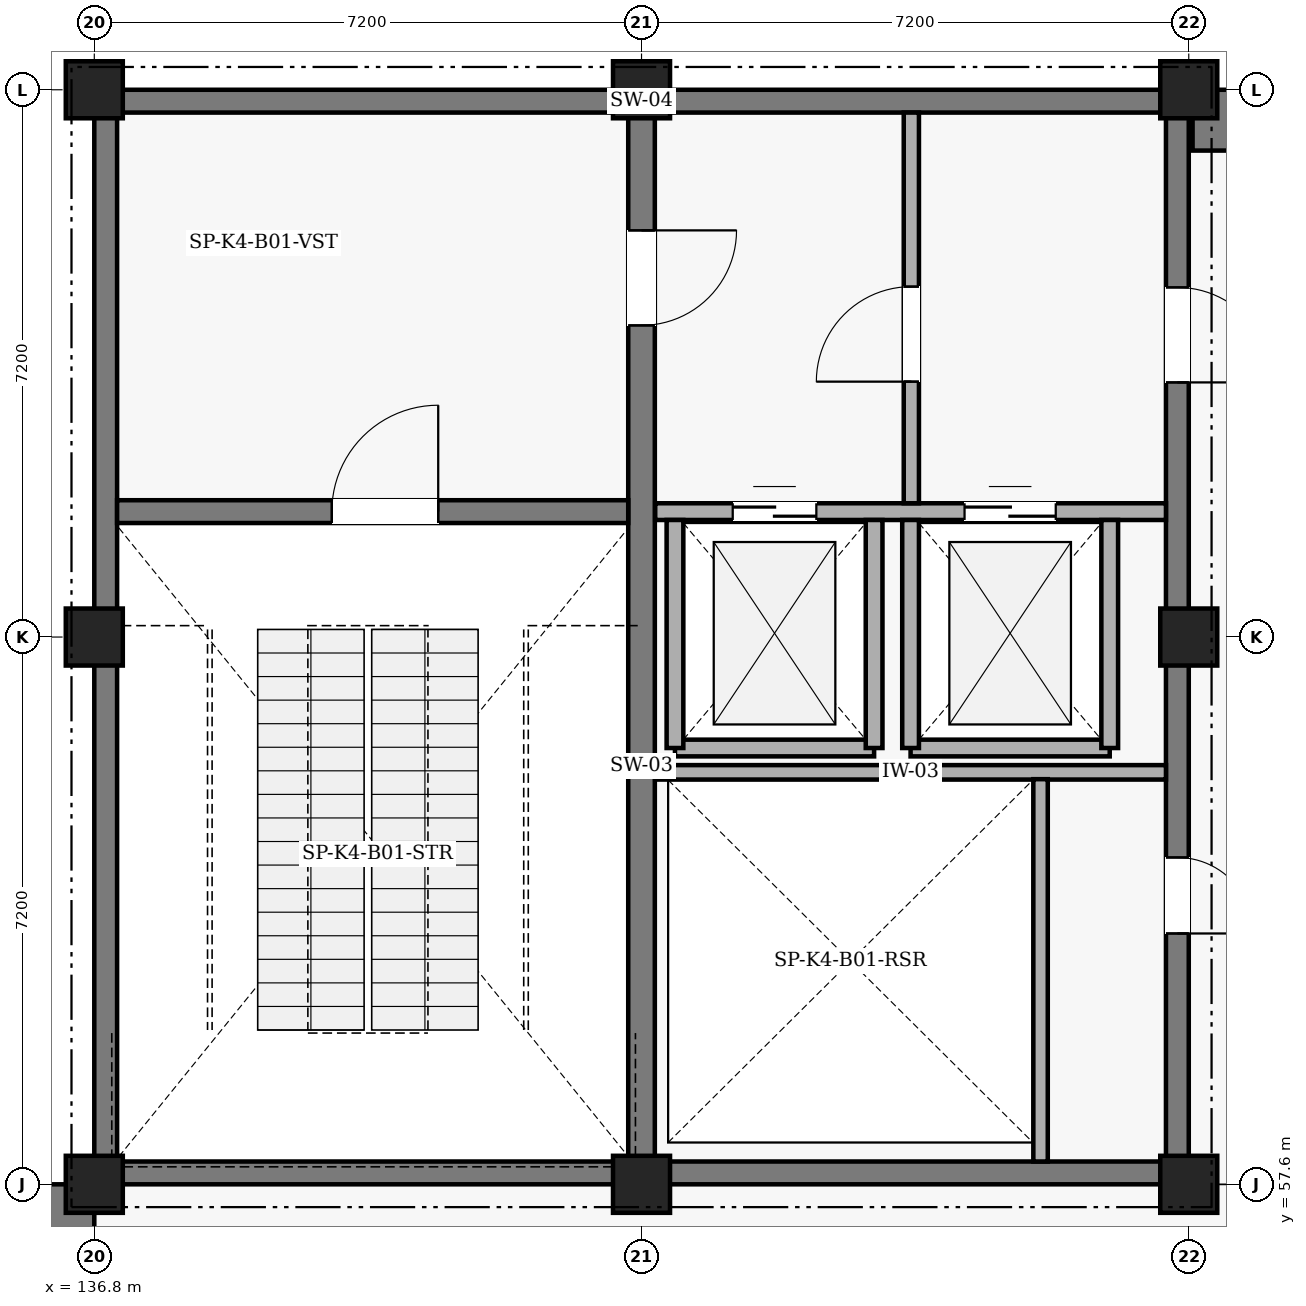
"""IFC4 building model, lengths in metres.
Left out: names, types, materials, properties, quantities, classifications, styles, units other than length and angle.
Written with IfcOpenShell. Run it as: python <this file> out.ifc"""

import sys

from ifc_helpers import new_model, si_unit, direction, frame, frame_2d, origin, origin_2d, place, context, subcontext, project, spatial, rectangle, extrude, element, fill, save


model = new_model("IFC4")
c1 = context("Model", 3, precision=1e-05, world=origin(), true_north=direction((0.0, 1.0)))
c2 = subcontext(c1, "Body", "Model", "MODEL_VIEW")
j1 = project(units=[si_unit("LENGTHUNIT", "METRE"), si_unit("PLANEANGLEUNIT", "RADIAN")], contexts=[c1])
p1 = place(None, origin())
s1 = spatial("IfcSite", under=j1, at=p1, CompositionType="ELEMENT")
p2 = place(p1, origin())
s2 = spatial("IfcBuilding", under=s1, at=p2, CompositionType="ELEMENT")
p3 = place(p2, frame((0.0, 0.0, -5.4)))
s3 = spatial("IfcBuildingStorey", under=s2, at=p3, CompositionType="ELEMENT", Elevation=-5.4)
p4 = place(p3, frame((123.3, 57.2, 0.0), z_axis=(0.0, 0.0, 1.0), x_axis=(1.0, 0.0, 0.0)))
e1 = element("IfcWall", 1, at=p4, inside=s3, PredefinedType="USERDEFINED", context=c2, shape_type="SweptSolid", body=[
    extrude(rectangle(XDim=13.5, YDim=0.8, at=frame_2d((6.75, 0.0))), origin(), (0.0, 0.0, 1.0), 4.95),
])
p5 = place(p3, frame((151.25, 71.6, 0.0), z_axis=(0.0, 0.0, 1.0), x_axis=(1.0, 0.0, 0.0)))
e2 = element("IfcWall", 2, at=p5, inside=s3, PredefinedType="USERDEFINED", context=c2, shape_type="SweptSolid", body=[
    extrude(rectangle(XDim=7.15, YDim=0.8, at=frame_2d((3.575, 0.0))), origin(), (0.0, 0.0, 1.0), 4.95),
])
p6 = place(p3, frame((136.8, 71.85, 0.0), z_axis=(0.0, 0.0, 1.0), x_axis=(1.0, 0.0, 0.0)))
e3 = element("IfcWall", 3, at=p6, inside=s3, PredefinedType="SHEAR", context=c2, shape_type="SweptSolid", body=[
    extrude(rectangle(XDim=14.4, YDim=0.3, at=frame_2d((7.2, 0.0))), origin(), (0.0, 0.0, 1.0), 5.4),
])
p7 = place(p3, frame((151.05, 71.7, 0.0), z_axis=(0.0, 0.0, 1.0), x_axis=(0.0, -1.0, 0.0)))
e4 = element("IfcWall", 4, at=p7, inside=s3, PredefinedType="SHEAR", context=c2, shape_type="SweptSolid", body=[
    extrude(rectangle(XDim=13.8, YDim=0.3, at=frame_2d((6.9, 0.0))), origin(), (0.0, 0.0, 1.0), 5.4),
])
p8 = place(p7, frame((9.8, 0.0, 0.0)))
e5 = element("IfcOpeningElement", 5, at=p8, cuts=e4, PredefinedType="OPENING", context=c2, shape_type="SweptSolid", body=[
    extrude(rectangle(XDim=1.0, YDim=2.15, at=frame_2d((0.5, 1.075))), frame((0.0, 0.16, 0.0), z_axis=(0.0, -1.0, 0.0), x_axis=(1.0, 0.0, 0.0)), (0.0, 0.0, 1.0), 0.32),
])
p9 = place(p7, frame((2.3, 0.0, 0.0)))
e6 = element("IfcOpeningElement", 6, at=p9, cuts=e4, PredefinedType="OPENING", context=c2, shape_type="SweptSolid", body=[
    extrude(rectangle(XDim=1.25, YDim=2.2, at=frame_2d((0.625, 1.1))), frame((0.0, 0.16, 0.0), z_axis=(0.0, -1.0, 0.0), x_axis=(1.0, 0.0, 0.0)), (0.0, 0.0, 1.0), 0.32),
])
p10 = place(p3, frame((151.2, 57.75, 0.0), z_axis=(0.0, 0.0, 1.0), x_axis=(-1.0, 0.0, 0.0)))
e7 = element("IfcWall", 7, at=p10, inside=s3, PredefinedType="SHEAR", context=c2, shape_type="SweptSolid", body=[
    extrude(rectangle(XDim=14.4, YDim=0.3, at=frame_2d((7.2, 0.0))), origin(), (0.0, 0.0, 1.0), 5.4),
])
p11 = place(p3, frame((136.95, 57.9, 0.0), z_axis=(0.0, 0.0, 1.0), x_axis=(0.0, 1.0, 0.0)))
e8 = element("IfcWall", 8, at=p11, inside=s3, PredefinedType="SHEAR", context=c2, shape_type="SweptSolid", body=[
    extrude(rectangle(XDim=13.8, YDim=0.3, at=frame_2d((6.9, 0.0))), origin(), (0.0, 0.0, 1.0), 5.4),
])
p12 = place(p3, frame((144.0, 71.7, 0.0), z_axis=(0.0, 0.0, 1.0), x_axis=(0.0, -1.0, 0.0)))
e9 = element("IfcWall", 9, at=p12, inside=s3, PredefinedType="SHEAR", context=c2, shape_type="SweptSolid", body=[
    extrude(rectangle(XDim=13.8, YDim=0.35, at=frame_2d((6.9, 0.0))), origin(), (0.0, 0.0, 1.0), 5.4),
])
p13 = place(p12, frame((1.55, 0.0, 0.0)))
e10 = element("IfcOpeningElement", 10, at=p13, cuts=e9, PredefinedType="OPENING", context=c2, shape_type="SweptSolid", body=[
    extrude(rectangle(XDim=1.25, YDim=2.2, at=frame_2d((0.625, 1.1))), frame((0.0, 0.185, 0.0), z_axis=(0.0, -1.0, 0.0), x_axis=(1.0, 0.0, 0.0)), (0.0, 0.0, 1.0), 0.37),
])
p14 = place(p3, frame((137.1, 66.45, 0.0), z_axis=(0.0, 0.0, 1.0), x_axis=(1.0, 0.0, 0.0)))
e11 = element("IfcWall", 11, at=p14, inside=s3, PredefinedType="SHEAR", context=c2, shape_type="SweptSolid", body=[
    extrude(rectangle(XDim=6.725, YDim=0.3, at=frame_2d((3.362, 0.0))), origin(), (0.0, 0.0, 1.0), 5.4),
])
p15 = place(p14, frame((2.825, 0.0, 0.0)))
e12 = element("IfcOpeningElement", 12, at=p15, cuts=e11, PredefinedType="OPENING", context=c2, shape_type="SweptSolid", body=[
    extrude(rectangle(XDim=1.4, YDim=2.2, at=frame_2d((0.7, 1.1))), frame((0.0, 0.16, 0.0), z_axis=(0.0, -1.0, 0.0), x_axis=(1.0, 0.0, 0.0)), (0.0, 0.0, 1.0), 0.32),
])
for number, where, z_axis, x_axis in (
    (13, (136.8, 57.6, 0.0), (0.0, 0.0, 1.0), (1.0, 0.0, 0.0)),
    (14, (136.8, 64.8, 0.0), (0.0, 0.0, 1.0), (1.0, 0.0, 0.0)),
    (15, (136.8, 72.0, 0.0), (0.0, 0.0, 1.0), (1.0, 0.0, 0.0)),
    (16, (144.0, 57.6, 0.0), (0.0, 0.0, 1.0), (1.0, 0.0, 0.0)),
    (17, (144.0, 72.0, 0.0), (0.0, 0.0, 1.0), (1.0, 0.0, 0.0)),
    (18, (151.2, 57.6, 0.0), (0.0, 0.0, 1.0), (1.0, 0.0, 0.0)),
    (19, (151.2, 64.8, 0.0), (0.0, 0.0, 1.0), (1.0, 0.0, 0.0)),
    (20, (151.2, 72.0, 0.0), (0.0, 0.0, 1.0), (1.0, 0.0, 0.0)),
):
    element("IfcColumn", number, at=place(p3, frame(where, z_axis=z_axis, x_axis=x_axis)), inside=s3, PredefinedType="COLUMN", context=c2, shape_type="SweptSolid", body=[
        extrude(rectangle(XDim=0.75, YDim=0.75, at=origin_2d()), origin(), (0.0, 0.0, 1.0), 5.0),
    ])
p16 = place(p3, frame((144.18, 63.02, 0.0), z_axis=(0.0, 0.0, 1.0), x_axis=(1.0, 0.0, 0.0)))
e21 = element("IfcWall", 21, at=p16, inside=s3, PredefinedType="PARTITIONING", context=c2, shape_type="SweptSolid", body=[
    extrude(rectangle(XDim=6.72, YDim=0.19, at=frame_2d((3.36, 0.0))), origin(), (0.0, 0.0, 1.0), 5.05),
])
p17 = place(p3, frame((149.25, 57.9, 0.0), z_axis=(0.0, 0.0, 1.0), x_axis=(0.0, 1.0, 0.0)))
e22 = element("IfcWall", 22, at=p17, inside=s3, PredefinedType="PARTITIONING", context=c2, shape_type="SweptSolid", body=[
    extrude(rectangle(XDim=5.03, YDim=0.19, at=frame_2d((2.515, 0.0))), origin(), (0.0, 0.0, 1.0), 5.05),
])
p18 = place(p3, frame((144.18, 66.45, 0.0), z_axis=(0.0, 0.0, 1.0), x_axis=(1.0, 0.0, 0.0)))
e23 = element("IfcWall", 23, at=p18, inside=s3, PredefinedType="PARTITIONING", context=c2, shape_type="SweptSolid", body=[
    extrude(rectangle(XDim=6.72, YDim=0.22, at=frame_2d((3.36, 0.0))), origin(), (0.0, 0.0, 1.0), 5.05),
])
p19 = place(p18, frame((1.02, 0.0, 0.0)))
e24 = element("IfcOpeningElement", 24, at=p19, cuts=e23, PredefinedType="OPENING", context=c2, shape_type="SweptSolid", body=[
    extrude(rectangle(XDim=1.1, YDim=2.15, at=frame_2d((0.55, 1.075))), frame((0.0, 0.12, 0.0), z_axis=(0.0, -1.0, 0.0), x_axis=(1.0, 0.0, 0.0)), (0.0, 0.0, 1.0), 0.24),
])
p20 = place(p18, frame((4.07, 0.0, 0.0)))
e25 = element("IfcOpeningElement", 25, at=p20, cuts=e23, PredefinedType="OPENING", context=c2, shape_type="SweptSolid", body=[
    extrude(rectangle(XDim=1.2, YDim=2.15, at=frame_2d((0.6, 1.075))), frame((0.0, 0.12, 0.0), z_axis=(0.0, -1.0, 0.0), x_axis=(1.0, 0.0, 0.0)), (0.0, 0.0, 1.0), 0.24),
])
p21 = place(p3, frame((144.44, 63.34, 0.0), z_axis=(0.0, 0.0, 1.0), x_axis=(1.0, 0.0, 0.0)))
e26 = element("IfcWall", 26, at=p21, inside=s3, PredefinedType="PARTITIONING", context=c2, shape_type="SweptSolid", body=[
    extrude(rectangle(XDim=2.62, YDim=0.22, at=frame_2d((1.31, 0.0))), origin(), (0.0, 0.0, 1.0), 5.05),
])
for number, where, z_axis, x_axis in (
    (27, (144.44, 63.34, 0.0), (0.0, 0.0, 1.0), (0.0, 1.0, 0.0)),
    (28, (147.06, 63.34, 0.0), (0.0, 0.0, 1.0), (0.0, 1.0, 0.0)),
):
    element("IfcWall", number, at=place(p3, frame(where, z_axis=z_axis, x_axis=x_axis)), inside=s3, PredefinedType="PARTITIONING", context=c2, shape_type="SweptSolid", body=[
        extrude(rectangle(XDim=3.0, YDim=0.22, at=frame_2d((1.5, 0.0))), origin(), (0.0, 0.0, 1.0), 5.05),
    ])
p22 = place(p3, frame((147.54, 63.34, 0.0), z_axis=(0.0, 0.0, 1.0), x_axis=(1.0, 0.0, 0.0)))
e29 = element("IfcWall", 29, at=p22, inside=s3, PredefinedType="PARTITIONING", context=c2, shape_type="SweptSolid", body=[
    extrude(rectangle(XDim=2.62, YDim=0.22, at=frame_2d((1.31, 0.0))), origin(), (0.0, 0.0, 1.0), 5.05),
])
for number, where, z_axis, x_axis in (
    (30, (147.54, 63.34, 0.0), (0.0, 0.0, 1.0), (0.0, 1.0, 0.0)),
    (31, (150.16, 63.34, 0.0), (0.0, 0.0, 1.0), (0.0, 1.0, 0.0)),
):
    element("IfcWall", number, at=place(p3, frame(where, z_axis=z_axis, x_axis=x_axis)), inside=s3, PredefinedType="PARTITIONING", context=c2, shape_type="SweptSolid", body=[
        extrude(rectangle(XDim=3.0, YDim=0.22, at=frame_2d((1.5, 0.0))), origin(), (0.0, 0.0, 1.0), 5.05),
    ])
p23 = place(p3, frame((147.55, 66.56, 0.0), z_axis=(0.0, 0.0, 1.0), x_axis=(0.0, 1.0, 0.0)))
e32 = element("IfcWall", 32, at=p23, inside=s3, PredefinedType="PARTITIONING", context=c2, shape_type="SweptSolid", body=[
    extrude(rectangle(XDim=5.14, YDim=0.2, at=frame_2d((2.57, 0.0))), origin(), (0.0, 0.0, 1.0), 5.05),
])
p24 = place(p23, frame((1.6, 0.0, 0.0)))
e33 = element("IfcOpeningElement", 33, at=p24, cuts=e32, PredefinedType="OPENING", context=c2, shape_type="SweptSolid", body=[
    extrude(rectangle(XDim=1.25, YDim=2.2, at=frame_2d((0.625, 1.1))), frame((0.0, 0.11, 0.0), z_axis=(0.0, -1.0, 0.0), x_axis=(1.0, 0.0, 0.0)), (0.0, 0.0, 1.0), 0.22),
])
p25 = place(p15, origin())
e34 = element("IfcDoor", 34, at=p25, inside=s3, OperationType="SINGLE_SWING_RIGHT", PredefinedType="DOOR", context=c2, shape_type="SweptSolid", body=[
    extrude(rectangle(XDim=1.4, YDim=2.2, at=frame_2d((0.7, 1.1))), frame((0.0, 0.025, 0.0), z_axis=(0.0, -1.0, 0.0), x_axis=(1.0, 0.0, 0.0)), (0.0, 0.0, 1.0), 0.05),
])
fill(e12, e34)
p26 = place(p13, origin())
e35 = element("IfcDoor", 35, at=p26, inside=s3, OperationType="SINGLE_SWING_LEFT", PredefinedType="DOOR", context=c2, shape_type="SweptSolid", body=[
    extrude(rectangle(XDim=1.25, YDim=2.2, at=frame_2d((0.625, 1.1))), frame((0.0, 0.025, 0.0), z_axis=(0.0, -1.0, 0.0), x_axis=(1.0, 0.0, 0.0)), (0.0, 0.0, 1.0), 0.05),
])
fill(e10, e35)
p27 = place(p8, origin())
e36 = element("IfcDoor", 36, at=p27, inside=s3, OperationType="SINGLE_SWING_RIGHT", PredefinedType="DOOR", context=c2, shape_type="SweptSolid", body=[
    extrude(rectangle(XDim=1.0, YDim=2.15, at=frame_2d((0.5, 1.075))), frame((0.0, 0.025, 0.0), z_axis=(0.0, -1.0, 0.0), x_axis=(1.0, 0.0, 0.0)), (0.0, 0.0, 1.0), 0.05),
])
fill(e5, e36)
p28 = place(p19, origin())
e37 = element("IfcDoor", 37, at=p28, inside=s3, OperationType="DOUBLE_DOOR_SLIDING", PredefinedType="DOOR", context=c2, shape_type="SweptSolid", body=[
    extrude(rectangle(XDim=1.1, YDim=2.15, at=frame_2d((0.55, 1.075))), frame((0.0, 0.025, 0.0), z_axis=(0.0, -1.0, 0.0), x_axis=(1.0, 0.0, 0.0)), (0.0, 0.0, 1.0), 0.05),
])
fill(e24, e37)
p29 = place(p20, origin())
e38 = element("IfcDoor", 38, at=p29, inside=s3, OperationType="DOUBLE_DOOR_SLIDING", PredefinedType="DOOR", context=c2, shape_type="SweptSolid", body=[
    extrude(rectangle(XDim=1.2, YDim=2.15, at=frame_2d((0.6, 1.075))), frame((0.0, 0.025, 0.0), z_axis=(0.0, -1.0, 0.0), x_axis=(1.0, 0.0, 0.0)), (0.0, 0.0, 1.0), 0.05),
])
fill(e25, e38)
p30 = place(p24, origin())
e39 = element("IfcDoor", 39, at=p30, inside=s3, OperationType="SINGLE_SWING_LEFT", PredefinedType="DOOR", context=c2, shape_type="SweptSolid", body=[
    extrude(rectangle(XDim=1.25, YDim=2.2, at=frame_2d((0.625, 1.1))), frame((0.0, 0.025, 0.0), z_axis=(0.0, -1.0, 0.0), x_axis=(1.0, 0.0, 0.0)), (0.0, 0.0, 1.0), 0.05),
])
fill(e33, e39)
p31 = place(p9, origin())
e40 = element("IfcDoor", 40, at=p31, inside=s3, OperationType="SINGLE_SWING_RIGHT", PredefinedType="DOOR", context=c2, shape_type="SweptSolid", body=[
    extrude(rectangle(XDim=1.25, YDim=2.2, at=frame_2d((0.625, 1.1))), frame((0.0, 0.025, 0.0), z_axis=(0.0, -1.0, 0.0), x_axis=(1.0, 0.0, 0.0)), (0.0, 0.0, 1.0), 0.05),
])
fill(e6, e40)
save(model, sys.argv[1])
